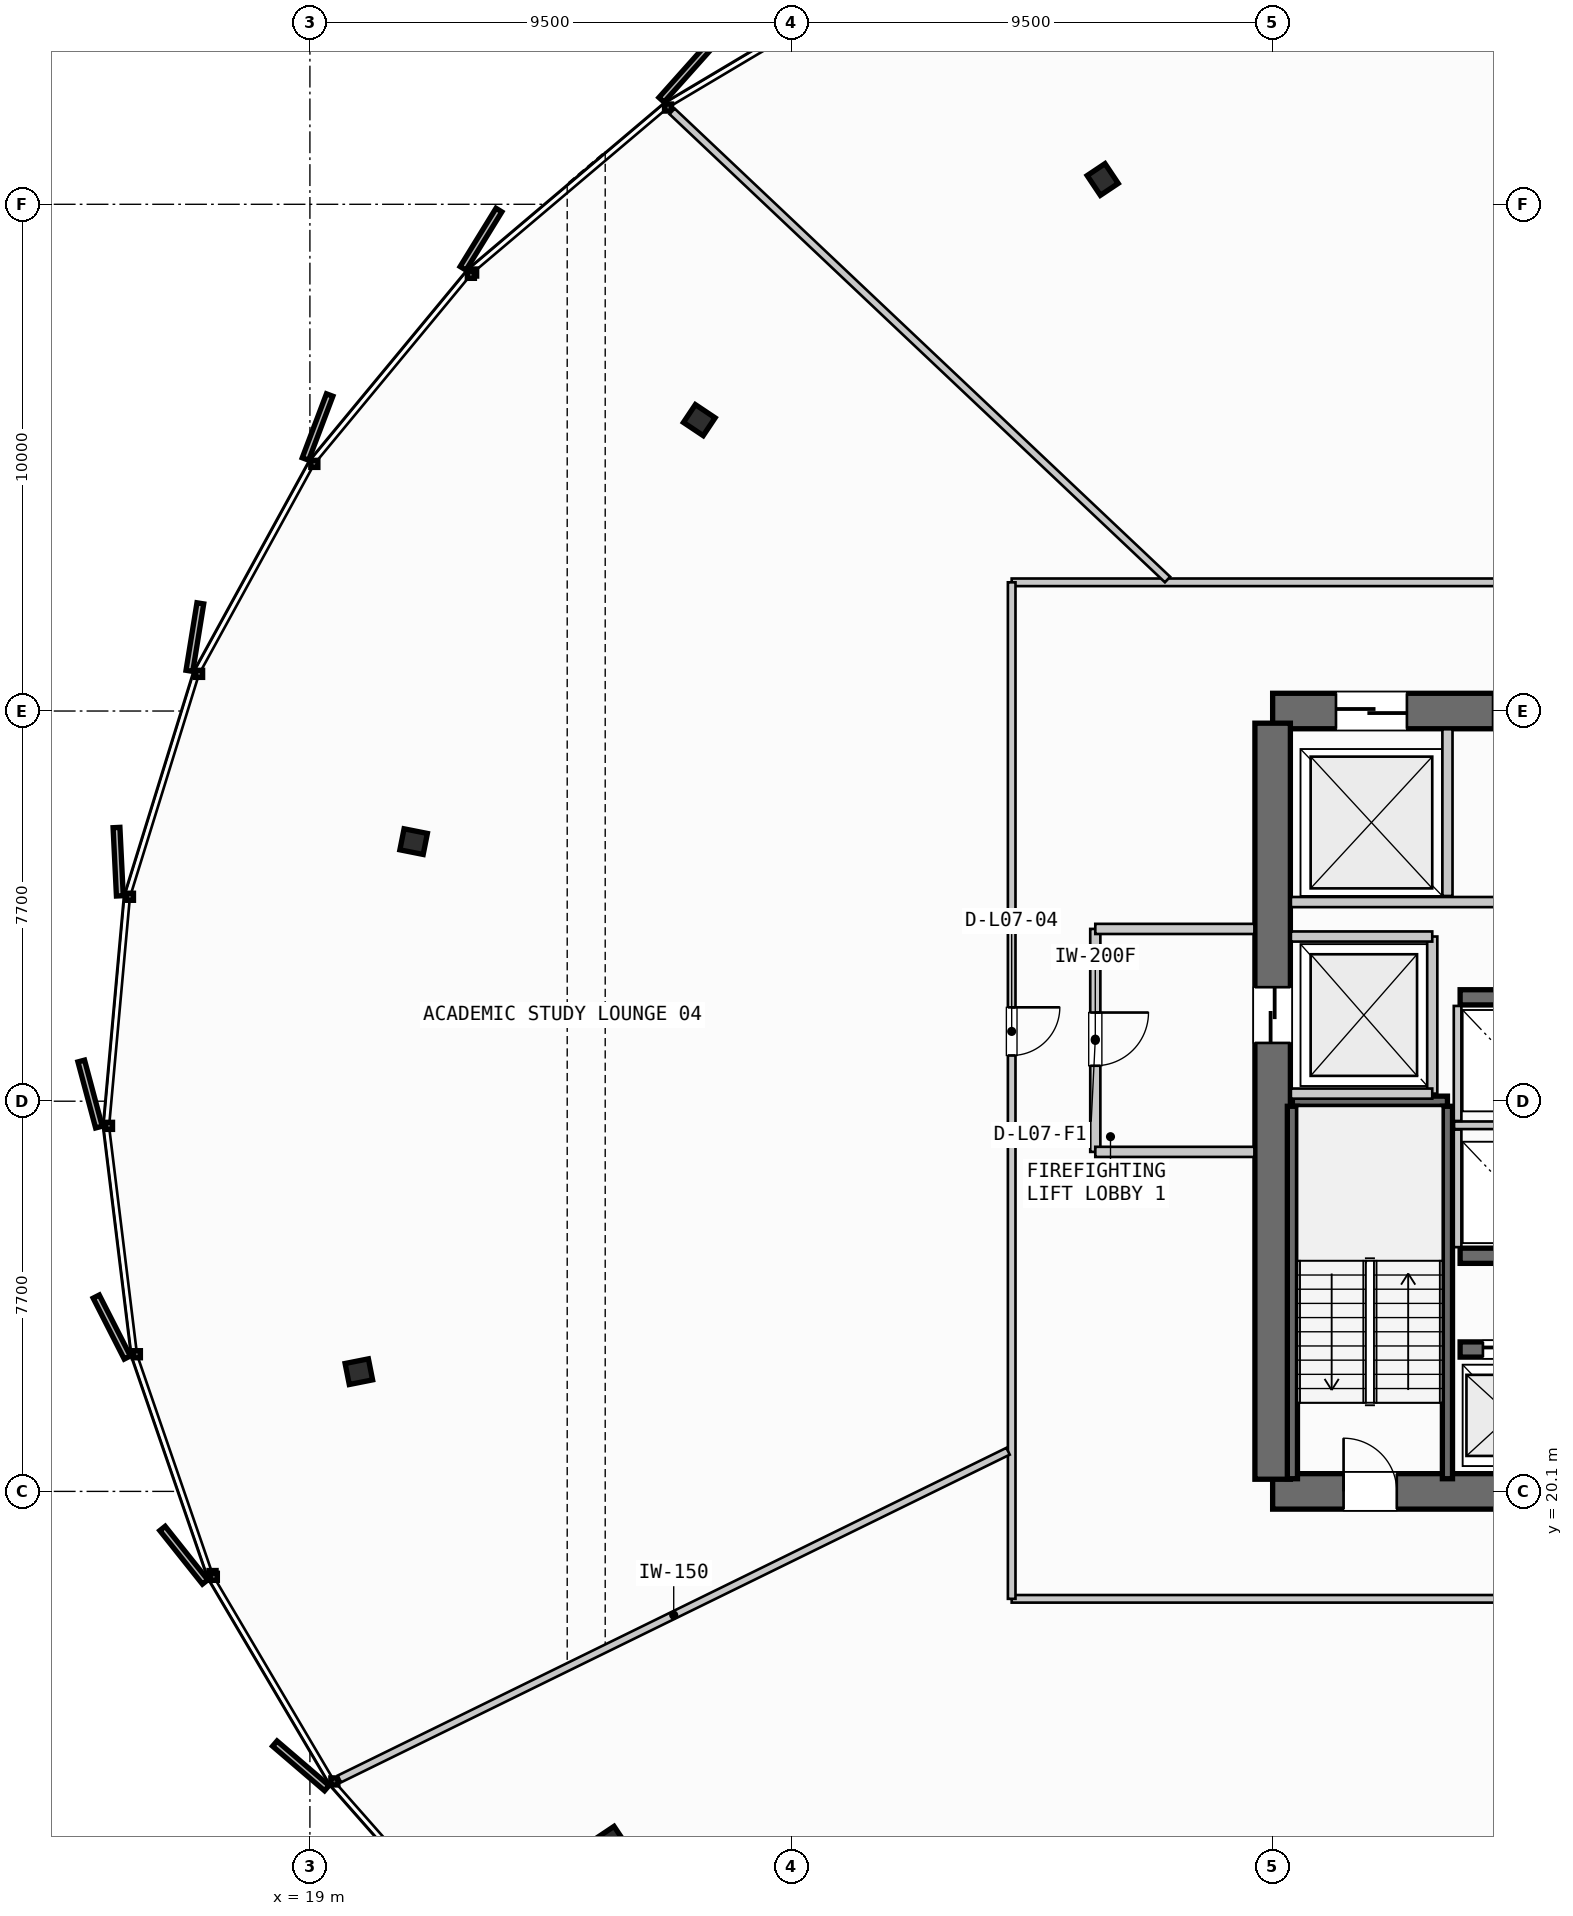
"""IFC4 building model, lengths in metres.
Left out: names, types, materials, properties, quantities, classifications, styles, units other than length and angle.
Written with IfcOpenShell. Run it as: python <this file> out.ifc"""

import sys

from ifc_helpers import new_model, si_unit, direction, frame, frame_2d, origin, origin_2d, place, context, subcontext, project, spatial, rectangle, i_section, extrude, source, transform, mapped, element, fill, save


model = new_model("IFC4")
c1 = context("Model", 3, precision=1e-05, world=origin(), true_north=direction((0.0, 1.0)))
c2 = subcontext(c1, "Body", "Model", "MODEL_VIEW")
j1 = project(units=[si_unit("LENGTHUNIT", "METRE"), si_unit("PLANEANGLEUNIT", "RADIAN")], contexts=[c1])
p1 = place(None, origin())
s1 = spatial("IfcSite", under=j1, at=p1, CompositionType="ELEMENT")
p2 = place(p1, origin())
s2 = spatial("IfcBuilding", under=s1, at=p2, CompositionType="ELEMENT")
p3 = place(p2, frame((0.0, 0.0, 33.4)))
s3 = spatial("IfcBuildingStorey", under=s2, at=p3, CompositionType="ELEMENT", Elevation=33.4)
p4 = place(p3, frame((38.0, 20.1, 0.0), z_axis=(0.0, 0.0, 1.0), x_axis=(1.0, 0.0, 0.0)))
e1 = element("IfcWall", 1, at=p4, inside=s3, PredefinedType="SHEAR", context=c2, shape_type="SweptSolid", body=[
    extrude(rectangle(XDim=17.6, YDim=0.7, at=frame_2d((8.8, 0.0))), origin(), (0.0, 0.0, 1.0), 3.55),
])
p5 = place(p4, frame((1.4, 0.0, 0.0)))
e2 = element("IfcOpeningElement", 2, at=p5, cuts=e1, PredefinedType="OPENING", context=c2, shape_type="SweptSolid", body=[
    extrude(rectangle(XDim=1.05, YDim=2.15, at=frame_2d((0.525, 1.075))), frame((0.0, 0.36, 0.0), z_axis=(0.0, -1.0, 0.0), x_axis=(1.0, 0.0, 0.0)), (0.0, 0.0, 1.0), 0.72),
])
p6 = place(p4, frame((15.15, 0.0, 0.0)))
e3 = element("IfcOpeningElement", 3, at=p6, cuts=e1, PredefinedType="OPENING", context=c2, shape_type="SweptSolid", body=[
    extrude(rectangle(XDim=1.05, YDim=2.15, at=frame_2d((0.525, 1.075))), frame((0.0, 0.36, 0.0), z_axis=(0.0, -1.0, 0.0), x_axis=(1.0, 0.0, 0.0)), (0.0, 0.0, 1.0), 0.72),
])
p7 = place(p3, frame((55.6, 35.5, 0.0), z_axis=(0.0, 0.0, 1.0), x_axis=(-1.0, 0.0, 0.0)))
e4 = element("IfcWall", 4, at=p7, inside=s3, PredefinedType="SHEAR", context=c2, shape_type="SweptSolid", body=[
    extrude(rectangle(XDim=17.6, YDim=0.7, at=frame_2d((8.8, 0.0))), origin(), (0.0, 0.0, 1.0), 3.55),
])
p8 = place(p7, frame((8.05, 0.0, 0.0)))
e5 = element("IfcOpeningElement", 5, at=p8, cuts=e4, PredefinedType="OPENING", context=c2, shape_type="SweptSolid", body=[
    extrude(rectangle(XDim=1.5, YDim=2.2, at=frame_2d((0.75, 1.1))), frame((0.0, 0.36, 0.0), z_axis=(0.0, -1.0, 0.0), x_axis=(1.0, 0.0, 0.0)), (0.0, 0.0, 1.0), 0.72),
])
p9 = place(p7, frame((14.95, 0.0, 0.0)))
e6 = element("IfcOpeningElement", 6, at=p9, cuts=e4, PredefinedType="OPENING", context=c2, shape_type="SweptSolid", body=[
    extrude(rectangle(XDim=1.4, YDim=2.3, at=frame_2d((0.7, 1.15))), frame((0.0, 0.36, 0.0), z_axis=(0.0, -1.0, 0.0), x_axis=(1.0, 0.0, 0.0)), (0.0, 0.0, 1.0), 0.72),
])
p10 = place(p7, frame((12.3, 0.0, 0.0)))
e7 = element("IfcOpeningElement", 7, at=p10, cuts=e4, PredefinedType="OPENING", context=c2, shape_type="SweptSolid", body=[
    extrude(rectangle(XDim=0.95, YDim=2.15, at=frame_2d((0.475, 1.075))), frame((0.0, 0.36, 0.0), z_axis=(0.0, -1.0, 0.0), x_axis=(1.0, 0.0, 0.0)), (0.0, 0.0, 1.0), 0.72),
])
p11 = place(p7, frame((10.2, 0.0, 0.0)))
e8 = element("IfcOpeningElement", 8, at=p11, cuts=e4, PredefinedType="OPENING", context=c2, shape_type="SweptSolid", body=[
    extrude(rectangle(XDim=0.9, YDim=2.15, at=frame_2d((0.45, 1.075))), frame((0.0, 0.36, 0.0), z_axis=(0.0, -1.0, 0.0), x_axis=(1.0, 0.0, 0.0)), (0.0, 0.0, 1.0), 0.72),
])
p12 = place(p3, frame((38.0, 35.26, 0.0), z_axis=(0.0, 0.0, 1.0), x_axis=(0.0, -1.0, 0.0)))
e9 = element("IfcWall", 9, at=p12, inside=s3, PredefinedType="SHEAR", context=c2, shape_type="SweptSolid", body=[
    extrude(rectangle(XDim=14.92, YDim=0.7, at=frame_2d((7.46, 0.0))), origin(), (0.0, 0.0, 1.0), 3.55),
])
p13 = place(p12, frame((5.21, 0.0, 0.0)))
e10 = element("IfcOpeningElement", 10, at=p13, cuts=e9, PredefinedType="OPENING", context=c2, shape_type="SweptSolid", body=[
    extrude(rectangle(XDim=1.1, YDim=2.2, at=frame_2d((0.55, 1.1))), frame((0.0, 0.36, 0.0), z_axis=(0.0, -1.0, 0.0), x_axis=(1.0, 0.0, 0.0)), (0.0, 0.0, 1.0), 0.72),
])
p14 = place(p3, frame((41.7, 22.9, 0.0), z_axis=(0.0, 0.0, 1.0), x_axis=(1.0, 0.0, 0.0)))
e11 = element("IfcWall", 11, at=p14, inside=s3, PredefinedType="SHEAR", context=c2, shape_type="SweptSolid", body=[
    extrude(rectangle(XDim=4.25, YDim=0.3, at=frame_2d((2.125, 0.0))), origin(), (0.0, 0.0, 1.0), 3.55),
])
p15 = place(p14, frame((0.45, 0.0, 0.0)))
e12 = element("IfcOpeningElement", 12, at=p15, cuts=e11, PredefinedType="OPENING", context=c2, shape_type="SweptSolid", body=[
    extrude(rectangle(XDim=1.1, YDim=2.2, at=frame_2d((0.55, 1.1))), frame((0.0, 0.16, 0.0), z_axis=(0.0, -1.0, 0.0), x_axis=(1.0, 0.0, 0.0)), (0.0, 0.0, 1.0), 0.32),
])
p16 = place(p14, frame((2.5, 0.0, 0.0)))
e13 = element("IfcOpeningElement", 13, at=p16, cuts=e11, PredefinedType="OPENING", context=c2, shape_type="SweptSolid", body=[
    extrude(rectangle(XDim=1.1, YDim=2.2, at=frame_2d((0.55, 1.1))), frame((0.0, 0.16, 0.0), z_axis=(0.0, -1.0, 0.0), x_axis=(1.0, 0.0, 0.0)), (0.0, 0.0, 1.0), 0.32),
])
for number, where, z_axis, x_axis in (
    (14, (41.7, 24.75, 0.0), (0.0, 0.0, 1.0), (1.0, 0.0, 0.0)),
    (15, (41.7, 29.85, 0.0), (0.0, 0.0, 1.0), (1.0, 0.0, 0.0)),
):
    element("IfcWall", number, at=place(p3, frame(where, z_axis=z_axis, x_axis=x_axis)), inside=s3, PredefinedType="SHEAR", context=c2, shape_type="SweptSolid", body=[
        extrude(rectangle(XDim=4.25, YDim=0.3, at=frame_2d((2.125, 0.0))), origin(), (0.0, 0.0, 1.0), 3.55),
    ])
m1 = source(origin(), c2, "Body", "SweptSolid", [
    extrude(i_section(OverallWidth=0.423, OverallDepth=0.469, WebThickness=0.051, FlangeThickness=0.081, FilletRadius=0.015, at=origin_2d()), origin(), (0.0, 0.0, 1.0), 3.55),
])
for number, where, z_axis, x_axis in (
    (16, (34.646, 45.99, 0.0), (0.0, 0.0, 1.0), (-0.556, 0.831, 0.0)),
    (17, (26.685, 41.241, 0.0), (0.0, 0.0, 1.0), (-0.831, 0.556, 0.0)),
    (18, (21.047, 32.923, 0.0), (0.0, 0.0, 1.0), (-0.981, 0.195, 0.0)),
    (19, (19.966, 22.462, 0.0), (0.0, 0.0, 1.0), (-0.981, -0.195, 0.0)),
    (20, (24.925, 13.183, 0.0), (0.0, 0.0, 1.0), (-0.831, -0.556, 0.0)),
):
    element("IfcColumn", number, at=place(p3, frame(where, z_axis=z_axis, x_axis=x_axis)), inside=s3, PredefinedType="COLUMN", context=c2, shape_type="MappedRepresentation", body=[
        mapped(m1, transform((0.0, 0.0, 0.0), scale=1.0)),
    ])
p17 = place(p3, frame((38.39, 27.8, 0.0), z_axis=(0.0, 0.0, 1.0), x_axis=(1.0, 0.0, 0.0)))
e21 = element("IfcWall", 21, at=p17, inside=s3, PredefinedType="SHEAR", context=c2, shape_type="SweptSolid", body=[
    extrude(rectangle(XDim=3.06, YDim=0.2, at=frame_2d((1.53, 0.0))), origin(), (0.0, 0.0, 1.0), 3.55),
])
for number, where, z_axis, x_axis in (
    (22, (41.45, 27.7, 0.0), (0.0, 0.0, 1.0), (0.0, -1.0, 0.0)),
    (23, (38.39, 20.35, 0.0), (0.0, 0.0, 1.0), (0.0, 1.0, 0.0)),
):
    element("IfcWall", number, at=place(p3, frame(where, z_axis=z_axis, x_axis=x_axis)), inside=s3, PredefinedType="SHEAR", context=c2, shape_type="SweptSolid", body=[
        extrude(rectangle(XDim=7.35, YDim=0.2, at=frame_2d((3.675, 0.0))), origin(), (0.0, 0.0, 1.0), 3.55),
    ])
p18 = place(p3, frame((41.15, 27.95, 0.0), z_axis=(0.0, 0.0, 1.0), x_axis=(0.0, 1.0, 0.0)))
e24 = element("IfcWall", 24, at=p18, inside=s3, PredefinedType="PARTITIONING", context=c2, shape_type="SweptSolid", body=[
    extrude(rectangle(XDim=3.1, YDim=0.2, at=frame_2d((1.55, 0.0))), origin(), (0.0, 0.0, 1.0), 2.925),
])
for number, where, z_axis, x_axis in (
    (25, (38.36, 27.95, 0.0), (0.0, 0.0, 1.0), (1.0, 0.0, 0.0)),
    (26, (38.36, 31.05, 0.0), (0.0, 0.0, 1.0), (1.0, 0.0, 0.0)),
):
    element("IfcWall", number, at=place(p3, frame(where, z_axis=z_axis, x_axis=x_axis)), inside=s3, PredefinedType="PARTITIONING", context=c2, shape_type="SweptSolid", body=[
        extrude(rectangle(XDim=2.79, YDim=0.2, at=frame_2d((1.395, 0.0))), origin(), (0.0, 0.0, 1.0), 2.925),
    ])
p19 = place(p3, frame((34.5, 31.2, 0.0), z_axis=(0.0, 0.0, 1.0), x_axis=(0.0, -1.0, 0.0)))
e27 = element("IfcWall", 27, at=p19, inside=s3, PredefinedType="PARTITIONING", context=c2, shape_type="SweptSolid", body=[
    extrude(rectangle(XDim=4.4, YDim=0.2, at=frame_2d((2.2, 0.0))), origin(), (0.0, 0.0, 1.0), 2.925),
])
p20 = place(p19, frame((1.65, 0.0, 0.0)))
e28 = element("IfcOpeningElement", 28, at=p20, cuts=e27, PredefinedType="OPENING", context=c2, shape_type="SweptSolid", body=[
    extrude(rectangle(XDim=1.05, YDim=2.15, at=frame_2d((0.525, 1.075))), frame((0.0, 0.11, 0.0), z_axis=(0.0, -1.0, 0.0), x_axis=(1.0, 0.0, 0.0)), (0.0, 0.0, 1.0), 0.22),
])
for number, where, z_axis, x_axis in (
    (29, (34.5, 26.8, 0.0), (0.0, 0.0, 1.0), (1.0, 0.0, 0.0)),
    (30, (34.5, 31.2, 0.0), (0.0, 0.0, 1.0), (1.0, 0.0, 0.0)),
):
    element("IfcWall", number, at=place(p3, frame(where, z_axis=z_axis, x_axis=x_axis)), inside=s3, PredefinedType="PARTITIONING", context=c2, shape_type="SweptSolid", body=[
        extrude(rectangle(XDim=3.14, YDim=0.2, at=frame_2d((1.57, 0.0))), origin(), (0.0, 0.0, 1.0), 2.925),
    ])
p21 = place(p3, frame((41.58, 27.325, 0.0), z_axis=(0.0, 0.0, 1.0), x_axis=(1.0, 0.0, 0.0)))
e31 = element("IfcWall", 31, at=p21, inside=s3, PredefinedType="PARTITIONING", context=c2, shape_type="SweptSolid", body=[
    extrude(rectangle(XDim=4.32, YDim=0.15, at=frame_2d((2.16, 0.0))), origin(), (0.0, 0.0, 1.0), 2.925),
])
p22 = place(p3, frame((41.65, 24.92, 0.0), z_axis=(0.0, 0.0, 1.0), x_axis=(0.0, 1.0, 0.0)))
e32 = element("IfcWall", 32, at=p22, inside=s3, PredefinedType="PARTITIONING", context=c2, shape_type="SweptSolid", body=[
    extrude(rectangle(XDim=2.32, YDim=0.15, at=frame_2d((1.16, 0.0))), origin(), (0.0, 0.0, 1.0), 2.925),
])
p23 = place(p3, frame((41.65, 27.41, 0.0), z_axis=(0.0, 0.0, 1.0), x_axis=(0.0, 1.0, 0.0)))
e33 = element("IfcWall", 33, at=p23, inside=s3, PredefinedType="PARTITIONING", context=c2, shape_type="SweptSolid", body=[
    extrude(rectangle(XDim=2.27, YDim=0.15, at=frame_2d((1.135, 0.0))), origin(), (0.0, 0.0, 1.0), 2.925),
])
p24 = place(p3, frame((41.45, 31.85, 0.0), z_axis=(0.0, 0.0, 1.0), x_axis=(0.0, 1.0, 0.0)))
e34 = element("IfcWall", 34, at=p24, inside=s3, PredefinedType="PARTITIONING", context=c2, shape_type="SweptSolid", body=[
    extrude(rectangle(XDim=3.29, YDim=0.2, at=frame_2d((1.645, 0.0))), origin(), (0.0, 0.0, 1.0), 2.925),
])
p25 = place(p3, frame((38.36, 31.73, 0.0), z_axis=(0.0, 0.0, 1.0), x_axis=(1.0, 0.0, 0.0)))
e35 = element("IfcWall", 35, at=p25, inside=s3, PredefinedType="PARTITIONING", context=c2, shape_type="SweptSolid", body=[
    extrude(rectangle(XDim=7.44, YDim=0.2, at=frame_2d((3.72, 0.0))), origin(), (0.0, 0.0, 1.0), 2.925),
])
p26 = place(p3, frame((32.85, 17.98, 0.0), z_axis=(0.0, 0.0, 1.0), x_axis=(1.0, 0.0, 0.0)))
e36 = element("IfcWall", 36, at=p26, inside=s3, PredefinedType="PARTITIONING", context=c2, shape_type="SweptSolid", body=[
    extrude(rectangle(XDim=28.42, YDim=0.15, at=frame_2d((14.21, 0.0))), origin(), (0.0, 0.0, 1.0), 2.925),
])
p27 = place(p26, frame((12.07, 0.0, 0.0)))
e37 = element("IfcOpeningElement", 37, at=p27, cuts=e36, PredefinedType="OPENING", context=c2, shape_type="SweptSolid", body=[
    extrude(rectangle(XDim=0.95, YDim=2.15, at=frame_2d((0.475, 1.075))), frame((0.0, 0.085, 0.0), z_axis=(0.0, -1.0, 0.0), x_axis=(1.0, 0.0, 0.0)), (0.0, 0.0, 1.0), 0.17),
])
p28 = place(p3, frame((61.27, 38.04, 0.0), z_axis=(0.0, 0.0, 1.0), x_axis=(-1.0, 0.0, 0.0)))
e38 = element("IfcWall", 38, at=p28, inside=s3, PredefinedType="PARTITIONING", context=c2, shape_type="SweptSolid", body=[
    extrude(rectangle(XDim=28.42, YDim=0.15, at=frame_2d((14.21, 0.0))), origin(), (0.0, 0.0, 1.0), 2.925),
])
p29 = place(p28, frame((12.522, 0.0, 0.0)))
e39 = element("IfcOpeningElement", 39, at=p29, cuts=e38, PredefinedType="OPENING", context=c2, shape_type="SweptSolid", body=[
    extrude(rectangle(XDim=0.95, YDim=2.15, at=frame_2d((0.475, 1.075))), frame((0.0, 0.085, 0.0), z_axis=(0.0, -1.0, 0.0), x_axis=(1.0, 0.0, 0.0)), (0.0, 0.0, 1.0), 0.17),
])
p30 = place(p3, frame((32.85, 38.04, 0.0), z_axis=(0.0, 0.0, 1.0), x_axis=(0.0, -1.0, 0.0)))
e40 = element("IfcWall", 40, at=p30, inside=s3, PredefinedType="PARTITIONING", context=c2, shape_type="SweptSolid", body=[
    extrude(rectangle(XDim=20.06, YDim=0.15, at=frame_2d((10.03, 0.0))), origin(), (0.0, 0.0, 1.0), 2.925),
])
p31 = place(p30, frame((8.387, 0.0, 0.0)))
e41 = element("IfcOpeningElement", 41, at=p31, cuts=e40, PredefinedType="OPENING", context=c2, shape_type="SweptSolid", body=[
    extrude(rectangle(XDim=0.95, YDim=2.15, at=frame_2d((0.475, 1.075))), frame((0.0, 0.085, 0.0), z_axis=(0.0, -1.0, 0.0), x_axis=(1.0, 0.0, 0.0)), (0.0, 0.0, 1.0), 0.17),
])
p32 = place(p3, frame((32.778, 20.892, 0.0), z_axis=(0.0, 0.0, 1.0), x_axis=(-0.897976844956, -0.440042709204, 0.0)))
e42 = element("IfcWall", 42, at=p32, inside=s3, PredefinedType="PARTITIONING", context=c2, shape_type="SweptSolid", body=[
    extrude(rectangle(XDim=14.696, YDim=0.15, at=frame_2d((7.348, 0.0))), origin(), (0.0, 0.0, 1.0), 2.925),
])
p33 = place(p3, frame((35.926, 38.095, 0.0), z_axis=(0.0, 0.0, 1.0), x_axis=(-0.726850560668, 0.686795648251, 0.0)))
e43 = element("IfcWall", 43, at=p33, inside=s3, PredefinedType="PARTITIONING", context=c2, shape_type="SweptSolid", body=[
    extrude(rectangle(XDim=13.452, YDim=0.15, at=frame_2d((6.726, 0.0))), origin(), (0.0, 0.0, 1.0), 2.925),
])
m2 = source(origin(), c2, "Body", "SweptSolid", [
    extrude(rectangle(XDim=1.05, YDim=2.15, at=frame_2d((0.525, 1.075))), frame((0.0, 0.025, 0.0), z_axis=(0.0, -1.0, 0.0), x_axis=(1.0, 0.0, 0.0)), (0.0, 0.0, 1.0), 0.05),
])
p34 = place(p5, origin())
e44 = element("IfcDoor", 44, at=p34, inside=s3, OperationType="SINGLE_SWING_LEFT", PredefinedType="DOOR", context=c2, shape_type="MappedRepresentation", body=[
    mapped(m2, transform((0.0, 0.0, 0.0), scale=1.0)),
])
fill(e2, e44)
m3 = source(origin(), c2, "Body", "SweptSolid", [
    extrude(rectangle(XDim=1.1, YDim=2.2, at=frame_2d((0.55, 1.1))), frame((0.0, 0.025, 0.0), z_axis=(0.0, -1.0, 0.0), x_axis=(1.0, 0.0, 0.0)), (0.0, 0.0, 1.0), 0.05),
])
p35 = place(p13, origin())
e45 = element("IfcDoor", 45, at=p35, inside=s3, OperationType="SLIDING_TO_LEFT", PredefinedType="DOOR", context=c2, shape_type="MappedRepresentation", body=[
    mapped(m3, transform((0.0, 0.0, 0.0), scale=1.0)),
])
fill(e10, e45)
p36 = place(p15, origin())
e46 = element("IfcDoor", 46, at=p36, inside=s3, OperationType="SLIDING_TO_LEFT", PredefinedType="DOOR", context=c2, shape_type="MappedRepresentation", body=[
    mapped(m3, transform((0.0, 0.0, 0.0), scale=1.0)),
])
fill(e12, e46)
m4 = source(origin(), c2, "Body", "SweptSolid", [
    extrude(rectangle(XDim=1.4, YDim=2.3, at=frame_2d((0.7, 1.15))), frame((0.0, 0.025, 0.0), z_axis=(0.0, -1.0, 0.0), x_axis=(1.0, 0.0, 0.0)), (0.0, 0.0, 1.0), 0.05),
])
p37 = place(p9, origin())
e47 = element("IfcDoor", 47, at=p37, inside=s3, OperationType="SLIDING_TO_RIGHT", PredefinedType="DOOR", context=c2, shape_type="MappedRepresentation", body=[
    mapped(m4, transform((0.0, 0.0, 0.0), scale=1.0)),
])
fill(e6, e47)
m5 = source(origin(), c2, "Body", "SweptSolid", [
    extrude(rectangle(XDim=0.95, YDim=2.15, at=frame_2d((0.475, 1.075))), frame((0.0, 0.025, 0.0), z_axis=(0.0, -1.0, 0.0), x_axis=(1.0, 0.0, 0.0)), (0.0, 0.0, 1.0), 0.05),
])
p38 = place(p10, origin())
e48 = element("IfcDoor", 48, at=p38, inside=s3, OperationType="SINGLE_SWING_LEFT", PredefinedType="DOOR", context=c2, shape_type="MappedRepresentation", body=[
    mapped(m5, transform((0.0, 0.0, 0.0), scale=1.0)),
])
fill(e7, e48)
p39 = place(p20, origin())
e49 = element("IfcDoor", 49, at=p39, inside=s3, OperationType="SINGLE_SWING_LEFT", PredefinedType="DOOR", context=c2, shape_type="MappedRepresentation", body=[
    mapped(m2, transform((0.0, 0.0, 0.0), scale=1.0)),
])
fill(e28, e49)
p40 = place(p31, origin())
e50 = element("IfcDoor", 50, at=p40, inside=s3, OperationType="SINGLE_SWING_LEFT", PredefinedType="DOOR", context=c2, shape_type="MappedRepresentation", body=[
    mapped(m5, transform((0.0, 0.0, 0.0), scale=1.0)),
])
fill(e41, e50)
save(model, sys.argv[1])
